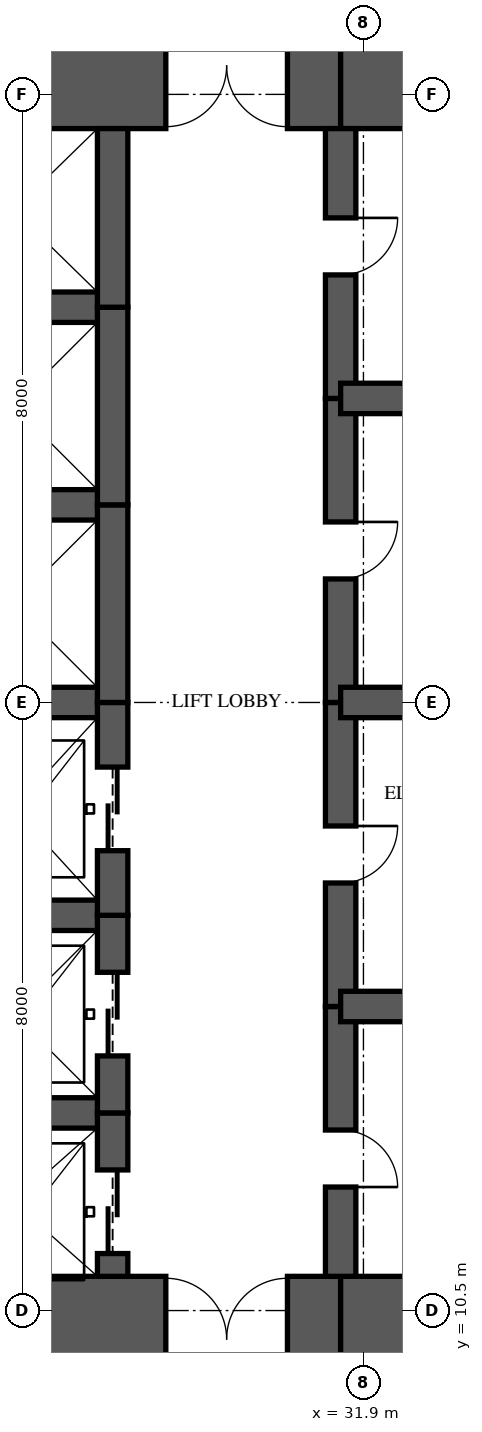
"""IFC4 building model, lengths in metres.
Left out: names, types, materials, properties, quantities, classifications, styles, units other than length and angle.
Written with IfcOpenShell. Run it as: python <this file> out.ifc"""

import sys

from ifc_helpers import new_model, si_unit, direction, frame, frame_2d, origin, place, context, subcontext, project, spatial, rectangle, extrude, element, fill, save


model = new_model("IFC4")
c1 = context("Model", 3, precision=1e-05, world=origin(), true_north=direction((0.0, 1.0)))
c2 = subcontext(c1, "Body", "Model", "MODEL_VIEW")
j1 = project(units=[si_unit("LENGTHUNIT", "METRE"), si_unit("PLANEANGLEUNIT", "RADIAN")], contexts=[c1])
p1 = place(None, origin())
s1 = spatial("IfcSite", under=j1, at=p1, CompositionType="ELEMENT")
p2 = place(p1, origin())
s2 = spatial("IfcBuilding", under=s1, at=p2, CompositionType="ELEMENT")
p3 = place(p2, frame((0.0, 0.0, 37.75)))
s3 = spatial("IfcBuildingStorey", under=s2, at=p3, CompositionType="ELEMENT", Elevation=37.75)
p4 = place(p3, frame((26.0, 10.125, 0.0), z_axis=(0.0, 0.0, 1.0), x_axis=(1.0, 0.0, 0.0)))
e1 = element("IfcWall", 1, at=p4, inside=s3, PredefinedType="SHEAR", context=c2, shape_type="SweptSolid", body=[
    extrude(rectangle(XDim=5.6, YDim=1.65, at=frame_2d((2.8, 0.0))), origin(), (0.0, 0.0, 1.0), 3.35),
])
p5 = place(p4, frame((3.3, 0.0, 0.0)))
e2 = element("IfcOpeningElement", 2, at=p5, cuts=e1, PredefinedType="OPENING", context=c2, shape_type="SweptSolid", body=[
    extrude(rectangle(XDim=1.6, YDim=2.1, at=frame_2d((0.8, 1.05))), frame((0.0, 0.835, 0.0), z_axis=(0.0, -1.0, 0.0), x_axis=(1.0, 0.0, 0.0)), (0.0, 0.0, 1.0), 1.67),
])
for number, where, z_axis, x_axis in (
    (3, (31.6, 10.125, 0.0), (0.0, 0.0, 1.0), (1.0, 0.0, 0.0)),
    (4, (35.9, 26.875, 0.0), (0.0, 0.0, 1.0), (-1.0, 0.0, 0.0)),
):
    element("IfcWall", number, at=place(p3, frame(where, z_axis=z_axis, x_axis=x_axis)), inside=s3, PredefinedType="SHEAR", context=c2, shape_type="SweptSolid", body=[
        extrude(rectangle(XDim=4.3, YDim=1.65, at=frame_2d((2.15, 0.0))), origin(), (0.0, 0.0, 1.0), 3.35),
    ])
p6 = place(p3, frame((31.6, 26.875, 0.0), z_axis=(0.0, 0.0, 1.0), x_axis=(-1.0, 0.0, 0.0)))
e5 = element("IfcWall", 5, at=p6, inside=s3, PredefinedType="SHEAR", context=c2, shape_type="SweptSolid", body=[
    extrude(rectangle(XDim=5.6, YDim=1.65, at=frame_2d((2.8, 0.0))), origin(), (0.0, 0.0, 1.0), 3.35),
])
p7 = place(p6, frame((0.7, 0.0, 0.0)))
e6 = element("IfcOpeningElement", 6, at=p7, cuts=e5, PredefinedType="OPENING", context=c2, shape_type="SweptSolid", body=[
    extrude(rectangle(XDim=1.6, YDim=2.1, at=frame_2d((0.8, 1.05))), frame((0.0, 0.835, 0.0), z_axis=(0.0, -1.0, 0.0), x_axis=(1.0, 0.0, 0.0)), (0.0, 0.0, 1.0), 1.67),
])
p8 = place(p3, frame((28.6, 10.95, 0.0), z_axis=(0.0, 0.0, 1.0), x_axis=(0.0, 1.0, 0.0)))
e7 = element("IfcWall", 7, at=p8, inside=s3, PredefinedType="SHEAR", context=c2, shape_type="SweptSolid", body=[
    extrude(rectangle(XDim=2.15, YDim=0.4, at=frame_2d((1.075, 0.0))), origin(), (0.0, 0.0, 1.0), 3.35),
])
p9 = place(p8, frame((0.3, 0.0, 0.0)))
e8 = element("IfcOpeningElement", 8, at=p9, cuts=e7, PredefinedType="OPENING", context=c2, shape_type="SweptSolid", body=[
    extrude(rectangle(XDim=1.1, YDim=2.1, at=frame_2d((0.55, 1.05))), frame((0.0, 0.21, 0.0), z_axis=(0.0, -1.0, 0.0), x_axis=(1.0, 0.0, 0.0)), (0.0, 0.0, 1.0), 0.42),
])
p10 = place(p3, frame((28.6, 13.1, 0.0), z_axis=(0.0, 0.0, 1.0), x_axis=(0.0, 1.0, 0.0)))
e9 = element("IfcWall", 9, at=p10, inside=s3, PredefinedType="SHEAR", context=c2, shape_type="SweptSolid", body=[
    extrude(rectangle(XDim=2.6, YDim=0.4, at=frame_2d((1.3, 0.0))), origin(), (0.0, 0.0, 1.0), 3.35),
])
p11 = place(p10, frame((0.75, 0.0, 0.0)))
e10 = element("IfcOpeningElement", 10, at=p11, cuts=e9, PredefinedType="OPENING", context=c2, shape_type="SweptSolid", body=[
    extrude(rectangle(XDim=1.1, YDim=2.1, at=frame_2d((0.55, 1.05))), frame((0.0, 0.21, 0.0), z_axis=(0.0, -1.0, 0.0), x_axis=(1.0, 0.0, 0.0)), (0.0, 0.0, 1.0), 0.42),
])
p12 = place(p3, frame((28.6, 15.7, 0.0), z_axis=(0.0, 0.0, 1.0), x_axis=(0.0, 1.0, 0.0)))
e11 = element("IfcWall", 11, at=p12, inside=s3, PredefinedType="SHEAR", context=c2, shape_type="SweptSolid", body=[
    extrude(rectangle(XDim=2.8, YDim=0.4, at=frame_2d((1.4, 0.0))), origin(), (0.0, 0.0, 1.0), 3.35),
])
p13 = place(p12, frame((0.85, 0.0, 0.0)))
e12 = element("IfcOpeningElement", 12, at=p13, cuts=e11, PredefinedType="OPENING", context=c2, shape_type="SweptSolid", body=[
    extrude(rectangle(XDim=1.1, YDim=2.1, at=frame_2d((0.55, 1.05))), frame((0.0, 0.21, 0.0), z_axis=(0.0, -1.0, 0.0), x_axis=(1.0, 0.0, 0.0)), (0.0, 0.0, 1.0), 0.42),
])
p14 = place(p3, frame((28.6, 18.5, 0.0), z_axis=(0.0, 0.0, 1.0), x_axis=(0.0, 1.0, 0.0)))
e13 = element("IfcWall", 13, at=p14, inside=s3, PredefinedType="SHEAR", context=c2, shape_type="SweptSolid", body=[
    extrude(rectangle(XDim=2.6, YDim=0.4, at=frame_2d((1.3, 0.0))), origin(), (0.0, 0.0, 1.0), 3.35),
])
p15 = place(p3, frame((28.6, 21.1, 0.0), z_axis=(0.0, 0.0, 1.0), x_axis=(0.0, 1.0, 0.0)))
e14 = element("IfcWall", 14, at=p15, inside=s3, PredefinedType="SHEAR", context=c2, shape_type="SweptSolid", body=[
    extrude(rectangle(XDim=2.6, YDim=0.4, at=frame_2d((1.3, 0.0))), origin(), (0.0, 0.0, 1.0), 3.35),
])
p16 = place(p3, frame((28.6, 23.7, 0.0), z_axis=(0.0, 0.0, 1.0), x_axis=(0.0, 1.0, 0.0)))
e15 = element("IfcWall", 15, at=p16, inside=s3, PredefinedType="SHEAR", context=c2, shape_type="SweptSolid", body=[
    extrude(rectangle(XDim=2.35, YDim=0.4, at=frame_2d((1.175, 0.0))), origin(), (0.0, 0.0, 1.0), 3.35),
])
p17 = place(p3, frame((31.6, 10.95, 0.0), z_axis=(0.0, 0.0, 1.0), x_axis=(0.0, 1.0, 0.0)))
e16 = element("IfcWall", 16, at=p17, inside=s3, PredefinedType="SHEAR", context=c2, shape_type="SweptSolid", body=[
    extrude(rectangle(XDim=3.55, YDim=0.4, at=frame_2d((1.775, 0.0))), origin(), (0.0, 0.0, 1.0), 3.35),
])
p18 = place(p17, frame((1.175, 0.0, 0.0)))
e17 = element("IfcOpeningElement", 17, at=p18, cuts=e16, PredefinedType="OPENING", context=c2, shape_type="SweptSolid", body=[
    extrude(rectangle(XDim=0.75, YDim=2.1, at=frame_2d((0.375, 1.05))), frame((0.0, 0.21, 0.0), z_axis=(0.0, -1.0, 0.0), x_axis=(1.0, 0.0, 0.0)), (0.0, 0.0, 1.0), 0.42),
])
p19 = place(p3, frame((31.6, 14.5, 0.0), z_axis=(0.0, 0.0, 1.0), x_axis=(0.0, 1.0, 0.0)))
e18 = element("IfcWall", 18, at=p19, inside=s3, PredefinedType="SHEAR", context=c2, shape_type="SweptSolid", body=[
    extrude(rectangle(XDim=4.0, YDim=0.4, at=frame_2d((2.0, 0.0))), origin(), (0.0, 0.0, 1.0), 3.35),
])
p20 = place(p19, frame((1.625, 0.0, 0.0)))
e19 = element("IfcOpeningElement", 19, at=p20, cuts=e18, PredefinedType="OPENING", context=c2, shape_type="SweptSolid", body=[
    extrude(rectangle(XDim=0.75, YDim=2.1, at=frame_2d((0.375, 1.05))), frame((0.0, 0.21, 0.0), z_axis=(0.0, -1.0, 0.0), x_axis=(1.0, 0.0, 0.0)), (0.0, 0.0, 1.0), 0.42),
])
p21 = place(p3, frame((31.6, 18.5, 0.0), z_axis=(0.0, 0.0, 1.0), x_axis=(0.0, 1.0, 0.0)))
e20 = element("IfcWall", 20, at=p21, inside=s3, PredefinedType="SHEAR", context=c2, shape_type="SweptSolid", body=[
    extrude(rectangle(XDim=4.0, YDim=0.4, at=frame_2d((2.0, 0.0))), origin(), (0.0, 0.0, 1.0), 3.35),
])
p22 = place(p21, frame((1.625, 0.0, 0.0)))
e21 = element("IfcOpeningElement", 21, at=p22, cuts=e20, PredefinedType="OPENING", context=c2, shape_type="SweptSolid", body=[
    extrude(rectangle(XDim=0.75, YDim=2.1, at=frame_2d((0.375, 1.05))), frame((0.0, 0.21, 0.0), z_axis=(0.0, -1.0, 0.0), x_axis=(1.0, 0.0, 0.0)), (0.0, 0.0, 1.0), 0.42),
])
p23 = place(p3, frame((31.6, 22.5, 0.0), z_axis=(0.0, 0.0, 1.0), x_axis=(0.0, 1.0, 0.0)))
e22 = element("IfcWall", 22, at=p23, inside=s3, PredefinedType="SHEAR", context=c2, shape_type="SweptSolid", body=[
    extrude(rectangle(XDim=3.55, YDim=0.4, at=frame_2d((1.775, 0.0))), origin(), (0.0, 0.0, 1.0), 3.35),
])
p24 = place(p23, frame((1.625, 0.0, 0.0)))
e23 = element("IfcOpeningElement", 23, at=p24, cuts=e22, PredefinedType="OPENING", context=c2, shape_type="SweptSolid", body=[
    extrude(rectangle(XDim=0.75, YDim=2.1, at=frame_2d((0.375, 1.05))), frame((0.0, 0.21, 0.0), z_axis=(0.0, -1.0, 0.0), x_axis=(1.0, 0.0, 0.0)), (0.0, 0.0, 1.0), 0.42),
])
for number, where, z_axis, x_axis in (
    (24, (26.0, 13.1, 0.0), (0.0, 0.0, 1.0), (1.0, 0.0, 0.0)),
    (25, (26.0, 15.7, 0.0), (0.0, 0.0, 1.0), (1.0, 0.0, 0.0)),
    (26, (26.0, 18.5, 0.0), (0.0, 0.0, 1.0), (1.0, 0.0, 0.0)),
    (27, (26.0, 21.1, 0.0), (0.0, 0.0, 1.0), (1.0, 0.0, 0.0)),
    (28, (26.0, 23.7, 0.0), (0.0, 0.0, 1.0), (1.0, 0.0, 0.0)),
):
    element("IfcWall", number, at=place(p3, frame(where, z_axis=z_axis, x_axis=x_axis)), inside=s3, PredefinedType="SHEAR", context=c2, shape_type="SweptSolid", body=[
        extrude(rectangle(XDim=2.6, YDim=0.4, at=frame_2d((1.3, 0.0))), origin(), (0.0, 0.0, 1.0), 3.35),
    ])
for number, where, z_axis, x_axis in (
    (29, (31.6, 14.5, 0.0), (0.0, 0.0, 1.0), (1.0, 0.0, 0.0)),
    (30, (31.6, 18.5, 0.0), (0.0, 0.0, 1.0), (1.0, 0.0, 0.0)),
    (31, (31.6, 22.5, 0.0), (0.0, 0.0, 1.0), (1.0, 0.0, 0.0)),
):
    element("IfcWall", number, at=place(p3, frame(where, z_axis=z_axis, x_axis=x_axis)), inside=s3, PredefinedType="SHEAR", context=c2, shape_type="SweptSolid", body=[
        extrude(rectangle(XDim=4.3, YDim=0.4, at=frame_2d((2.15, 0.0))), origin(), (0.0, 0.0, 1.0), 3.35),
    ])
p25 = place(p9, origin())
e32 = element("IfcDoor", 32, at=p25, inside=s3, OperationType="SLIDING_TO_LEFT", PredefinedType="DOOR", context=c2, shape_type="SweptSolid", body=[
    extrude(rectangle(XDim=1.1, YDim=2.1, at=frame_2d((0.55, 1.05))), frame((0.0, 0.025, 0.0), z_axis=(0.0, -1.0, 0.0), x_axis=(1.0, 0.0, 0.0)), (0.0, 0.0, 1.0), 0.05),
])
fill(e8, e32)
p26 = place(p11, origin())
e33 = element("IfcDoor", 33, at=p26, inside=s3, OperationType="SLIDING_TO_LEFT", PredefinedType="DOOR", context=c2, shape_type="SweptSolid", body=[
    extrude(rectangle(XDim=1.1, YDim=2.1, at=frame_2d((0.55, 1.05))), frame((0.0, 0.025, 0.0), z_axis=(0.0, -1.0, 0.0), x_axis=(1.0, 0.0, 0.0)), (0.0, 0.0, 1.0), 0.05),
])
fill(e10, e33)
p27 = place(p13, origin())
e34 = element("IfcDoor", 34, at=p27, inside=s3, OperationType="SLIDING_TO_LEFT", PredefinedType="DOOR", context=c2, shape_type="SweptSolid", body=[
    extrude(rectangle(XDim=1.1, YDim=2.1, at=frame_2d((0.55, 1.05))), frame((0.0, 0.025, 0.0), z_axis=(0.0, -1.0, 0.0), x_axis=(1.0, 0.0, 0.0)), (0.0, 0.0, 1.0), 0.05),
])
fill(e12, e34)
p28 = place(p5, origin())
e35 = element("IfcDoor", 35, at=p28, inside=s3, OperationType="DOUBLE_DOOR_SINGLE_SWING", PredefinedType="DOOR", context=c2, shape_type="SweptSolid", body=[
    extrude(rectangle(XDim=1.6, YDim=2.1, at=frame_2d((0.8, 1.05))), frame((0.0, 0.025, 0.0), z_axis=(0.0, -1.0, 0.0), x_axis=(1.0, 0.0, 0.0)), (0.0, 0.0, 1.0), 0.05),
])
fill(e2, e35)
p29 = place(p7, origin())
e36 = element("IfcDoor", 36, at=p29, inside=s3, OperationType="DOUBLE_DOOR_SINGLE_SWING", PredefinedType="DOOR", context=c2, shape_type="SweptSolid", body=[
    extrude(rectangle(XDim=1.6, YDim=2.1, at=frame_2d((0.8, 1.05))), frame((0.0, 0.025, 0.0), z_axis=(0.0, -1.0, 0.0), x_axis=(1.0, 0.0, 0.0)), (0.0, 0.0, 1.0), 0.05),
])
fill(e6, e36)
p30 = place(p18, frame((0.75, 0.0, 0.0), z_axis=(0.0, 0.0, 1.0), x_axis=(-1.0, 0.0, 0.0)))
e37 = element("IfcDoor", 37, at=p30, inside=s3, OperationType="SINGLE_SWING_RIGHT", PredefinedType="DOOR", context=c2, shape_type="SweptSolid", body=[
    extrude(rectangle(XDim=0.75, YDim=2.1, at=frame_2d((0.375, 1.05))), frame((0.0, 0.025, 0.0), z_axis=(0.0, -1.0, 0.0), x_axis=(1.0, 0.0, 0.0)), (0.0, 0.0, 1.0), 0.05),
])
fill(e17, e37)
p31 = place(p20, frame((0.75, 0.0, 0.0), z_axis=(0.0, 0.0, 1.0), x_axis=(-1.0, 0.0, 0.0)))
e38 = element("IfcDoor", 38, at=p31, inside=s3, OperationType="SINGLE_SWING_LEFT", PredefinedType="DOOR", context=c2, shape_type="SweptSolid", body=[
    extrude(rectangle(XDim=0.75, YDim=2.1, at=frame_2d((0.375, 1.05))), frame((0.0, 0.025, 0.0), z_axis=(0.0, -1.0, 0.0), x_axis=(1.0, 0.0, 0.0)), (0.0, 0.0, 1.0), 0.05),
])
fill(e19, e38)
p32 = place(p22, frame((0.75, 0.0, 0.0), z_axis=(0.0, 0.0, 1.0), x_axis=(-1.0, 0.0, 0.0)))
e39 = element("IfcDoor", 39, at=p32, inside=s3, OperationType="SINGLE_SWING_LEFT", PredefinedType="DOOR", context=c2, shape_type="SweptSolid", body=[
    extrude(rectangle(XDim=0.75, YDim=2.1, at=frame_2d((0.375, 1.05))), frame((0.0, 0.025, 0.0), z_axis=(0.0, -1.0, 0.0), x_axis=(1.0, 0.0, 0.0)), (0.0, 0.0, 1.0), 0.05),
])
fill(e21, e39)
p33 = place(p24, frame((0.75, 0.0, 0.0), z_axis=(0.0, 0.0, 1.0), x_axis=(-1.0, 0.0, 0.0)))
e40 = element("IfcDoor", 40, at=p33, inside=s3, OperationType="SINGLE_SWING_LEFT", PredefinedType="DOOR", context=c2, shape_type="SweptSolid", body=[
    extrude(rectangle(XDim=0.75, YDim=2.1, at=frame_2d((0.375, 1.05))), frame((0.0, 0.025, 0.0), z_axis=(0.0, -1.0, 0.0), x_axis=(1.0, 0.0, 0.0)), (0.0, 0.0, 1.0), 0.05),
])
fill(e23, e40)
save(model, sys.argv[1])
